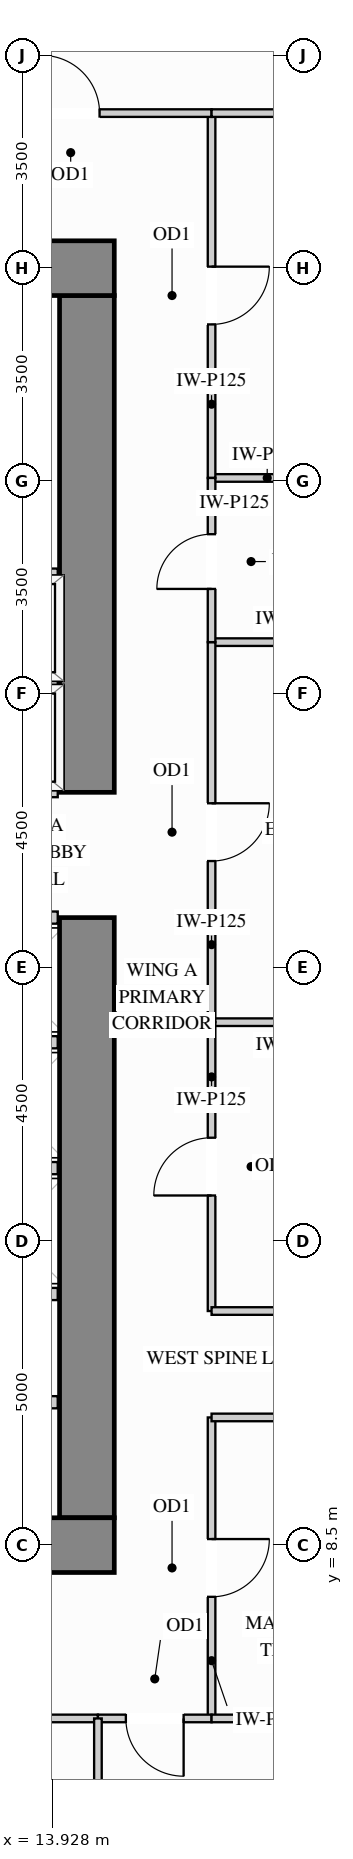
"""IFC4 building model, lengths in metres.
Left out: names, types, materials, properties, quantities, classifications, styles, units other than length and angle.
Written with IfcOpenShell. Run it as: python <this file> out.ifc"""

import sys

from ifc_helpers import new_model, si_unit, direction, frame, frame_2d, origin, place, context, subcontext, project, spatial, rectangle, extrude, source, transform, mapped, element, fill, save


model = new_model("IFC4")
c1 = context("Model", 3, precision=1e-05, world=origin(), true_north=direction((0.0, 1.0)))
c2 = subcontext(c1, "Body", "Model", "MODEL_VIEW")
j1 = project(units=[si_unit("LENGTHUNIT", "METRE"), si_unit("PLANEANGLEUNIT", "RADIAN")], contexts=[c1])
p1 = place(None, origin())
s1 = spatial("IfcSite", under=j1, at=p1, CompositionType="ELEMENT")
p2 = place(p1, origin())
s2 = spatial("IfcBuilding", under=s1, at=p2, CompositionType="ELEMENT")
p3 = place(p2, frame((0.0, 0.0, 36.9)))
s3 = spatial("IfcBuildingStorey", under=s2, at=p3, CompositionType="ELEMENT", Elevation=36.9)
m1 = source(origin(), c2, "Body", "SweptSolid", [
    extrude(rectangle(XDim=9.87, YDim=0.9, at=frame_2d((4.935, 0.0))), origin(), (0.0, 0.0, 1.0), 3.38),
])
p4 = place(p3, frame((14.5, 8.95, 0.0), z_axis=(0.0, 0.0, 1.0), x_axis=(0.0, 1.0, 0.0)))
e1 = element("IfcWall", 1, at=p4, inside=s3, PredefinedType="SHEAR", context=c2, shape_type="MappedRepresentation", body=[
    mapped(m1, transform((0.0, 0.0, 0.0), x_axis=(1.0, 0.0, 0.0), y_axis=(0.0, 1.0, 0.0), z_axis=(0.0, 0.0, 1.0))),
])
m2 = source(origin(), c2, "Body", "SweptSolid", [
    extrude(rectangle(XDim=8.17, YDim=0.9, at=frame_2d((4.085, 0.0))), origin(), (0.0, 0.0, 1.0), 3.38),
])
p5 = place(p3, frame((14.5, 20.88, 0.0), z_axis=(0.0, 0.0, 1.0), x_axis=(0.0, 1.0, 0.0)))
e2 = element("IfcWall", 2, at=p5, inside=s3, PredefinedType="SHEAR", context=c2, shape_type="MappedRepresentation", body=[
    mapped(m2, transform((0.0, 0.0, 0.0), x_axis=(1.0, 0.0, 0.0), y_axis=(0.0, 1.0, 0.0), z_axis=(0.0, 0.0, 1.0))),
])
m3 = source(origin(), c2, "Body", "SweptSolid", [
    extrude(rectangle(XDim=10.9, YDim=0.9, at=frame_2d((5.45, 0.0))), origin(), (0.0, 0.0, 1.0), 3.38),
])
for number, where, z_axis, x_axis in (
    (3, (4.05, 29.5, 0.0), (0.0, 0.0, 1.0), (1.0, 0.0, 0.0)),
    (4, (4.05, 8.5, 0.0), (0.0, 0.0, 1.0), (1.0, 0.0, 0.0)),
):
    element("IfcWall", number, at=place(p3, frame(where, z_axis=z_axis, x_axis=x_axis)), inside=s3, PredefinedType="SHEAR", context=c2, shape_type="MappedRepresentation", body=[
        mapped(m3, transform((0.0, 0.0, 0.0), x_axis=(1.0, 0.0, 0.0), y_axis=(0.0, 1.0, 0.0), z_axis=(0.0, 0.0, 1.0))),
    ])
m4 = source(origin(), c2, "Body", "SweptSolid", [
    extrude(rectangle(XDim=2.6, YDim=0.125, at=frame_2d((1.3, 0.0))), origin(), (0.0, 0.0, 1.0), 3.365),
])
p6 = place(p3, frame((16.55, 17.1, 0.0), z_axis=(0.0, 0.0, 1.0), x_axis=(1.0, 0.0, 0.0)))
e5 = element("IfcWall", 5, at=p6, inside=s3, PredefinedType="PARTITIONING", context=c2, shape_type="MappedRepresentation", body=[
    mapped(m4, transform((0.0, 0.0, 0.0), x_axis=(1.0, 0.0, 0.0), y_axis=(0.0, 1.0, 0.0), z_axis=(0.0, 0.0, 1.0))),
])
m5 = source(origin(), c2, "Body", "SweptSolid", [
    extrude(rectangle(XDim=2.598, YDim=0.125, at=frame_2d((1.299, 0.0))), origin(), (0.0, 0.0, 1.0), 3.365),
])
for number, where, z_axis, x_axis in (
    (6, (16.55, 23.35, 0.0), (0.0, 0.0, 1.0), (1.0, 0.0, 0.0)),
    (7, (16.55, 26.05, 0.0), (0.0, 0.0, 1.0), (1.0, 0.0, 0.0)),
):
    element("IfcWall", number, at=place(p3, frame(where, z_axis=z_axis, x_axis=x_axis)), inside=s3, PredefinedType="PARTITIONING", context=c2, shape_type="MappedRepresentation", body=[
        mapped(m5, transform((0.0, 0.0, 0.0), x_axis=(1.0, 0.0, 0.0), y_axis=(0.0, 1.0, 0.0), z_axis=(0.0, 0.0, 1.0))),
    ])
p7 = place(p3, frame((16.55, 12.35, 0.0), z_axis=(0.0, 0.0, 1.0), x_axis=(0.0, 1.0, 0.0)))
e8 = element("IfcWall", 8, at=p7, inside=s3, PredefinedType="PARTITIONING", context=c2, shape_type="SweptSolid", body=[
    extrude(rectangle(XDim=4.75, YDim=0.125, at=frame_2d((2.375, 0.0))), origin(), (0.0, 0.0, 1.0), 3.365),
])
p8 = place(p7, frame((1.9, 0.0, 0.0)))
e9 = element("IfcOpeningElement", 9, at=p8, cuts=e8, PredefinedType="OPENING", context=c2, shape_type="SweptSolid", body=[
    extrude(rectangle(XDim=0.95, YDim=2.15, at=frame_2d((0.475, 1.075))), frame((0.0, 0.073, 0.0), z_axis=(0.0, -1.0, 0.0), x_axis=(1.0, 0.0, 0.0)), (0.0, 0.0, 1.0), 0.145),
])
p9 = place(p3, frame((16.55, 17.1, 0.0), z_axis=(0.0, 0.0, 1.0), x_axis=(0.0, 1.0, 0.0)))
e10 = element("IfcWall", 10, at=p9, inside=s3, PredefinedType="PARTITIONING", context=c2, shape_type="SweptSolid", body=[
    extrude(rectangle(XDim=6.25, YDim=0.125, at=frame_2d((3.125, 0.0))), origin(), (0.0, 0.0, 1.0), 3.365),
])
p10 = place(p9, frame((2.65, 0.0, 0.0)))
e11 = element("IfcOpeningElement", 11, at=p10, cuts=e10, PredefinedType="OPENING", context=c2, shape_type="SweptSolid", body=[
    extrude(rectangle(XDim=0.95, YDim=2.15, at=frame_2d((0.475, 1.075))), frame((0.0, 0.073, 0.0), z_axis=(0.0, -1.0, 0.0), x_axis=(1.0, 0.0, 0.0)), (0.0, 0.0, 1.0), 0.145),
])
p11 = place(p3, frame((16.55, 26.05, 0.0), z_axis=(0.0, 0.0, 1.0), x_axis=(0.0, 1.0, 0.0)))
e12 = element("IfcWall", 12, at=p11, inside=s3, PredefinedType="PARTITIONING", context=c2, shape_type="SweptSolid", body=[
    extrude(rectangle(XDim=6.0, YDim=0.125, at=frame_2d((3.0, 0.0))), origin(), (0.0, 0.0, 1.0), 3.365),
])
p12 = place(p11, frame((2.525, 0.0, 0.0)))
e13 = element("IfcOpeningElement", 13, at=p12, cuts=e12, PredefinedType="OPENING", context=c2, shape_type="SweptSolid", body=[
    extrude(rectangle(XDim=0.95, YDim=2.15, at=frame_2d((0.475, 1.075))), frame((0.0, 0.073, 0.0), z_axis=(0.0, -1.0, 0.0), x_axis=(1.0, 0.0, 0.0)), (0.0, 0.0, 1.0), 0.145),
])
p13 = place(p3, frame((16.55, 5.65, 0.0), z_axis=(0.0, 0.0, 1.0), x_axis=(0.0, 1.0, 0.0)))
e14 = element("IfcWall", 14, at=p13, inside=s3, PredefinedType="PARTITIONING", context=c2, shape_type="SweptSolid", body=[
    extrude(rectangle(XDim=4.95, YDim=0.125, at=frame_2d((2.475, 0.0))), origin(), (0.0, 0.0, 1.0), 3.365),
])
p14 = place(p13, frame((2.0, 0.0, 0.0)))
e15 = element("IfcOpeningElement", 15, at=p14, cuts=e14, PredefinedType="OPENING", context=c2, shape_type="SweptSolid", body=[
    extrude(rectangle(XDim=0.95, YDim=2.15, at=frame_2d((0.475, 1.075))), frame((0.0, 0.073, 0.0), z_axis=(0.0, -1.0, 0.0), x_axis=(1.0, 0.0, 0.0)), (0.0, 0.0, 1.0), 0.145),
])
p15 = place(p3, frame((16.55, 23.35, 0.0), z_axis=(0.0, 0.0, 1.0), x_axis=(0.0, 1.0, 0.0)))
e16 = element("IfcWall", 16, at=p15, inside=s3, PredefinedType="PARTITIONING", context=c2, shape_type="SweptSolid", body=[
    extrude(rectangle(XDim=2.7, YDim=0.125, at=frame_2d((1.35, 0.0))), origin(), (0.0, 0.0, 1.0), 3.365),
])
p16 = place(p15, frame((0.875, 0.0, 0.0)))
e17 = element("IfcOpeningElement", 17, at=p16, cuts=e16, PredefinedType="OPENING", context=c2, shape_type="SweptSolid", body=[
    extrude(rectangle(XDim=0.9, YDim=2.15, at=frame_2d((0.45, 1.075))), frame((0.0, 0.073, 0.0), z_axis=(0.0, -1.0, 0.0), x_axis=(1.0, 0.0, 0.0)), (0.0, 0.0, 1.0), 0.145),
])
p17 = place(p3, frame((11.916, 32.05, 0.0), z_axis=(0.0, 0.0, 1.0), x_axis=(1.0, 0.0, 0.0)))
e18 = element("IfcWall", 18, at=p17, inside=s3, PredefinedType="PARTITIONING", context=c2, shape_type="SweptSolid", body=[
    extrude(rectangle(XDim=4.634, YDim=0.125, at=frame_2d((2.317, 0.0))), origin(), (0.0, 0.0, 1.0), 3.365),
])
p18 = place(p17, frame((1.842, 0.0, 0.0)))
e19 = element("IfcOpeningElement", 19, at=p18, cuts=e18, PredefinedType="OPENING", context=c2, shape_type="SweptSolid", body=[
    extrude(rectangle(XDim=0.95, YDim=2.15, at=frame_2d((0.475, 1.075))), frame((0.0, 0.073, 0.0), z_axis=(0.0, -1.0, 0.0), x_axis=(1.0, 0.0, 0.0)), (0.0, 0.0, 1.0), 0.145),
])
p19 = place(p3, frame((16.55, 32.05, 0.0), z_axis=(0.0, 0.0, 1.0), x_axis=(1.0, 0.0, 0.0)))
e20 = element("IfcWall", 20, at=p19, inside=s3, PredefinedType="PARTITIONING", context=c2, shape_type="MappedRepresentation", body=[
    mapped(m5, transform((0.0, 0.0, 0.0), x_axis=(1.0, 0.0, 0.0), y_axis=(0.0, 1.0, 0.0), z_axis=(0.0, 0.0, 1.0))),
])
m6 = source(origin(), c2, "Body", "SweptSolid", [
    extrude(rectangle(XDim=2.95, YDim=0.125, at=frame_2d((1.475, 0.0))), origin(), (0.0, 0.0, 1.0), 3.365),
])
for number, where, z_axis, x_axis in (
    (21, (16.55, 12.35, 0.0), (0.0, 0.0, 1.0), (1.0, 0.0, 0.0)),
    (22, (16.55, 10.6, 0.0), (0.0, 0.0, 1.0), (1.0, 0.0, 0.0)),
):
    element("IfcWall", number, at=place(p3, frame(where, z_axis=z_axis, x_axis=x_axis)), inside=s3, PredefinedType="PARTITIONING", context=c2, shape_type="MappedRepresentation", body=[
        mapped(m6, transform((0.0, 0.0, 0.0), x_axis=(1.0, 0.0, 0.0), y_axis=(0.0, 1.0, 0.0), z_axis=(0.0, 0.0, 1.0))),
    ])
p20 = place(p3, frame((9.22, 5.65, 0.0), z_axis=(0.0, 0.0, 1.0), x_axis=(1.0, 0.0, 0.0)))
e23 = element("IfcWall", 23, at=p20, inside=s3, PredefinedType="PARTITIONING", context=c2, shape_type="SweptSolid", body=[
    extrude(rectangle(XDim=5.461, YDim=0.125, at=frame_2d((2.73, 0.0))), origin(), (0.0, 0.0, 1.0), 3.365),
])
p21 = place(p20, frame((2.256, 0.0, 0.0)))
e24 = element("IfcOpeningElement", 24, at=p21, cuts=e23, PredefinedType="OPENING", context=c2, shape_type="SweptSolid", body=[
    extrude(rectangle(XDim=0.95, YDim=2.15, at=frame_2d((0.475, 1.075))), frame((0.0, 0.073, 0.0), z_axis=(0.0, -1.0, 0.0), x_axis=(1.0, 0.0, 0.0)), (0.0, 0.0, 1.0), 0.145),
])
p22 = place(p3, frame((14.681, 5.65, 0.0), z_axis=(0.0, 0.0, 1.0), x_axis=(1.0, 0.0, 0.0)))
e25 = element("IfcWall", 25, at=p22, inside=s3, PredefinedType="PARTITIONING", context=c2, shape_type="SweptSolid", body=[
    extrude(rectangle(XDim=1.869, YDim=0.125, at=frame_2d((0.935, 0.0))), origin(), (0.0, 0.0, 1.0), 3.365),
])
p23 = place(p22, frame((0.459, 0.0, 0.0)))
e26 = element("IfcOpeningElement", 26, at=p23, cuts=e25, PredefinedType="OPENING", context=c2, shape_type="SweptSolid", body=[
    extrude(rectangle(XDim=0.95, YDim=2.15, at=frame_2d((0.475, 1.075))), frame((0.0, 0.073, 0.0), z_axis=(0.0, -1.0, 0.0), x_axis=(1.0, 0.0, 0.0)), (0.0, 0.0, 1.0), 0.145),
])
p24 = place(p3, frame((16.55, 5.65, 0.0), z_axis=(0.0, 0.0, 1.0), x_axis=(1.0, 0.0, 0.0)))
e27 = element("IfcWall", 27, at=p24, inside=s3, PredefinedType="PARTITIONING", context=c2, shape_type="MappedRepresentation", body=[
    mapped(m5, transform((0.0, 0.0, 0.0), x_axis=(1.0, 0.0, 0.0), y_axis=(0.0, 1.0, 0.0), z_axis=(0.0, 0.0, 1.0))),
])
m7 = source(origin(), c2, "Body", "SweptSolid", [
    extrude(rectangle(XDim=4.39, YDim=0.125, at=frame_2d((2.195, 0.0))), origin(), (0.0, 0.0, 1.0), 3.365),
])
p25 = place(p3, frame((14.681, 1.26, 0.0), z_axis=(0.0, 0.0, 1.0), x_axis=(0.0, 1.0, 0.0)))
e28 = element("IfcWall", 28, at=p25, inside=s3, PredefinedType="PARTITIONING", context=c2, shape_type="MappedRepresentation", body=[
    mapped(m7, transform((0.0, 0.0, 0.0), x_axis=(1.0, 0.0, 0.0), y_axis=(0.0, 1.0, 0.0), z_axis=(0.0, 0.0, 1.0))),
])
m8 = source(origin(), c2, "Body", "SweptSolid", [
    extrude(rectangle(XDim=1.6, YDim=0.2, at=frame_2d((0.8, 0.0))), origin(), (0.0, 0.0, 1.0), 3.365),
])
p26 = place(p3, frame((12.42, 10.85, 0.0), z_axis=(0.0, 0.0, 1.0), x_axis=(1.0, 0.0, 0.0)))
e29 = element("IfcWall", 29, at=p26, inside=s3, PredefinedType="PARTITIONING", context=c2, shape_type="MappedRepresentation", body=[
    mapped(m8, transform((0.0, 0.0, 0.0), x_axis=(1.0, 0.0, 0.0), y_axis=(0.0, 1.0, 0.0), z_axis=(0.0, 0.0, 1.0))),
])
m9 = source(origin(), c2, "Body", "SweptSolid", [
    extrude(rectangle(XDim=2.19, YDim=0.2, at=frame_2d((1.095, 0.0))), origin(), (0.0, 0.0, 1.0), 3.365),
])
for number, where, z_axis, x_axis in (
    (30, (11.83, 22.66, 0.0), (0.0, 0.0, 1.0), (1.0, 0.0, 0.0)),
    (31, (11.83, 20.9, 0.0), (0.0, 0.0, 1.0), (1.0, 0.0, 0.0)),
    (32, (11.83, 24.46, 0.0), (0.0, 0.0, 1.0), (1.0, 0.0, 0.0)),
):
    element("IfcWall", number, at=place(p3, frame(where, z_axis=z_axis, x_axis=x_axis)), inside=s3, PredefinedType="PARTITIONING", context=c2, shape_type="MappedRepresentation", body=[
        mapped(m9, transform((0.0, 0.0, 0.0), x_axis=(1.0, 0.0, 0.0), y_axis=(0.0, 1.0, 0.0), z_axis=(0.0, 0.0, 1.0))),
    ])
m10 = source(origin(), c2, "Body", "SweptSolid", [
    extrude(rectangle(XDim=1.79, YDim=0.2, at=frame_2d((0.895, 0.0))), origin(), (0.0, 0.0, 1.0), 3.365),
])
for number, where, z_axis, x_axis in (
    (33, (12.23, 14.7, 0.0), (0.0, 0.0, 1.0), (1.0, 0.0, 0.0)),
    (34, (12.23, 12.63, 0.0), (0.0, 0.0, 1.0), (1.0, 0.0, 0.0)),
    (35, (12.23, 16.77, 0.0), (0.0, 0.0, 1.0), (1.0, 0.0, 0.0)),
    (36, (12.23, 18.82, 0.0), (0.0, 0.0, 1.0), (1.0, 0.0, 0.0)),
):
    element("IfcWall", number, at=place(p3, frame(where, z_axis=z_axis, x_axis=x_axis)), inside=s3, PredefinedType="PARTITIONING", context=c2, shape_type="MappedRepresentation", body=[
        mapped(m10, transform((0.0, 0.0, 0.0), x_axis=(1.0, 0.0, 0.0), y_axis=(0.0, 1.0, 0.0), z_axis=(0.0, 0.0, 1.0))),
    ])
m11 = source(origin(), c2, "Body", "SweptSolid", [
    extrude(rectangle(XDim=0.95, YDim=2.15, at=frame_2d((0.475, 1.075))), frame((0.0, 0.025, 0.0), z_axis=(0.0, -1.0, 0.0), x_axis=(1.0, 0.0, 0.0)), (0.0, 0.0, 1.0), 0.05),
])
p27 = place(p14, origin())
e37 = element("IfcDoor", 37, at=p27, inside=s3, OperationType="SINGLE_SWING_RIGHT", PredefinedType="DOOR", context=c2, shape_type="MappedRepresentation", body=[
    mapped(m11, transform((0.0, 0.0, 0.0), x_axis=(1.0, 0.0, 0.0), y_axis=(0.0, 1.0, 0.0), z_axis=(0.0, 0.0, 1.0))),
])
fill(e15, e37)
p28 = place(p8, origin())
e38 = element("IfcDoor", 38, at=p28, inside=s3, OperationType="SINGLE_SWING_LEFT", PredefinedType="DOOR", context=c2, shape_type="MappedRepresentation", body=[
    mapped(m11, transform((0.0, 0.0, 0.0), x_axis=(1.0, 0.0, 0.0), y_axis=(0.0, 1.0, 0.0), z_axis=(0.0, 0.0, 1.0))),
])
fill(e9, e38)
p29 = place(p10, origin())
e39 = element("IfcDoor", 39, at=p29, inside=s3, OperationType="SINGLE_SWING_RIGHT", PredefinedType="DOOR", context=c2, shape_type="MappedRepresentation", body=[
    mapped(m11, transform((0.0, 0.0, 0.0), x_axis=(1.0, 0.0, 0.0), y_axis=(0.0, 1.0, 0.0), z_axis=(0.0, 0.0, 1.0))),
])
fill(e11, e39)
p30 = place(p12, origin())
e40 = element("IfcDoor", 40, at=p30, inside=s3, OperationType="SINGLE_SWING_RIGHT", PredefinedType="DOOR", context=c2, shape_type="MappedRepresentation", body=[
    mapped(m11, transform((0.0, 0.0, 0.0), x_axis=(1.0, 0.0, 0.0), y_axis=(0.0, 1.0, 0.0), z_axis=(0.0, 0.0, 1.0))),
])
fill(e13, e40)
p31 = place(p18, origin())
e41 = element("IfcDoor", 41, at=p31, inside=s3, OperationType="SINGLE_SWING_LEFT", PredefinedType="DOOR", context=c2, shape_type="MappedRepresentation", body=[
    mapped(m11, transform((0.0, 0.0, 0.0), x_axis=(1.0, 0.0, 0.0), y_axis=(0.0, 1.0, 0.0), z_axis=(0.0, 0.0, 1.0))),
])
fill(e19, e41)
p32 = place(p23, origin())
e42 = element("IfcDoor", 42, at=p32, inside=s3, OperationType="SINGLE_SWING_RIGHT", PredefinedType="DOOR", context=c2, shape_type="MappedRepresentation", body=[
    mapped(m11, transform((0.0, 0.0, 0.0), x_axis=(1.0, 0.0, 0.0), y_axis=(0.0, 1.0, 0.0), z_axis=(0.0, 0.0, 1.0))),
])
fill(e26, e42)
m12 = source(origin(), c2, "Body", "SweptSolid", [
    extrude(rectangle(XDim=0.9, YDim=2.15, at=frame_2d((0.45, 1.075))), frame((0.0, 0.025, 0.0), z_axis=(0.0, -1.0, 0.0), x_axis=(1.0, 0.0, 0.0)), (0.0, 0.0, 1.0), 0.05),
])
p33 = place(p16, origin())
e43 = element("IfcDoor", 43, at=p33, inside=s3, OperationType="SINGLE_SWING_LEFT", PredefinedType="DOOR", context=c2, shape_type="MappedRepresentation", body=[
    mapped(m12, transform((0.0, 0.0, 0.0), x_axis=(1.0, 0.0, 0.0), y_axis=(0.0, 1.0, 0.0), z_axis=(0.0, 0.0, 1.0))),
])
fill(e17, e43)
save(model, sys.argv[1])
